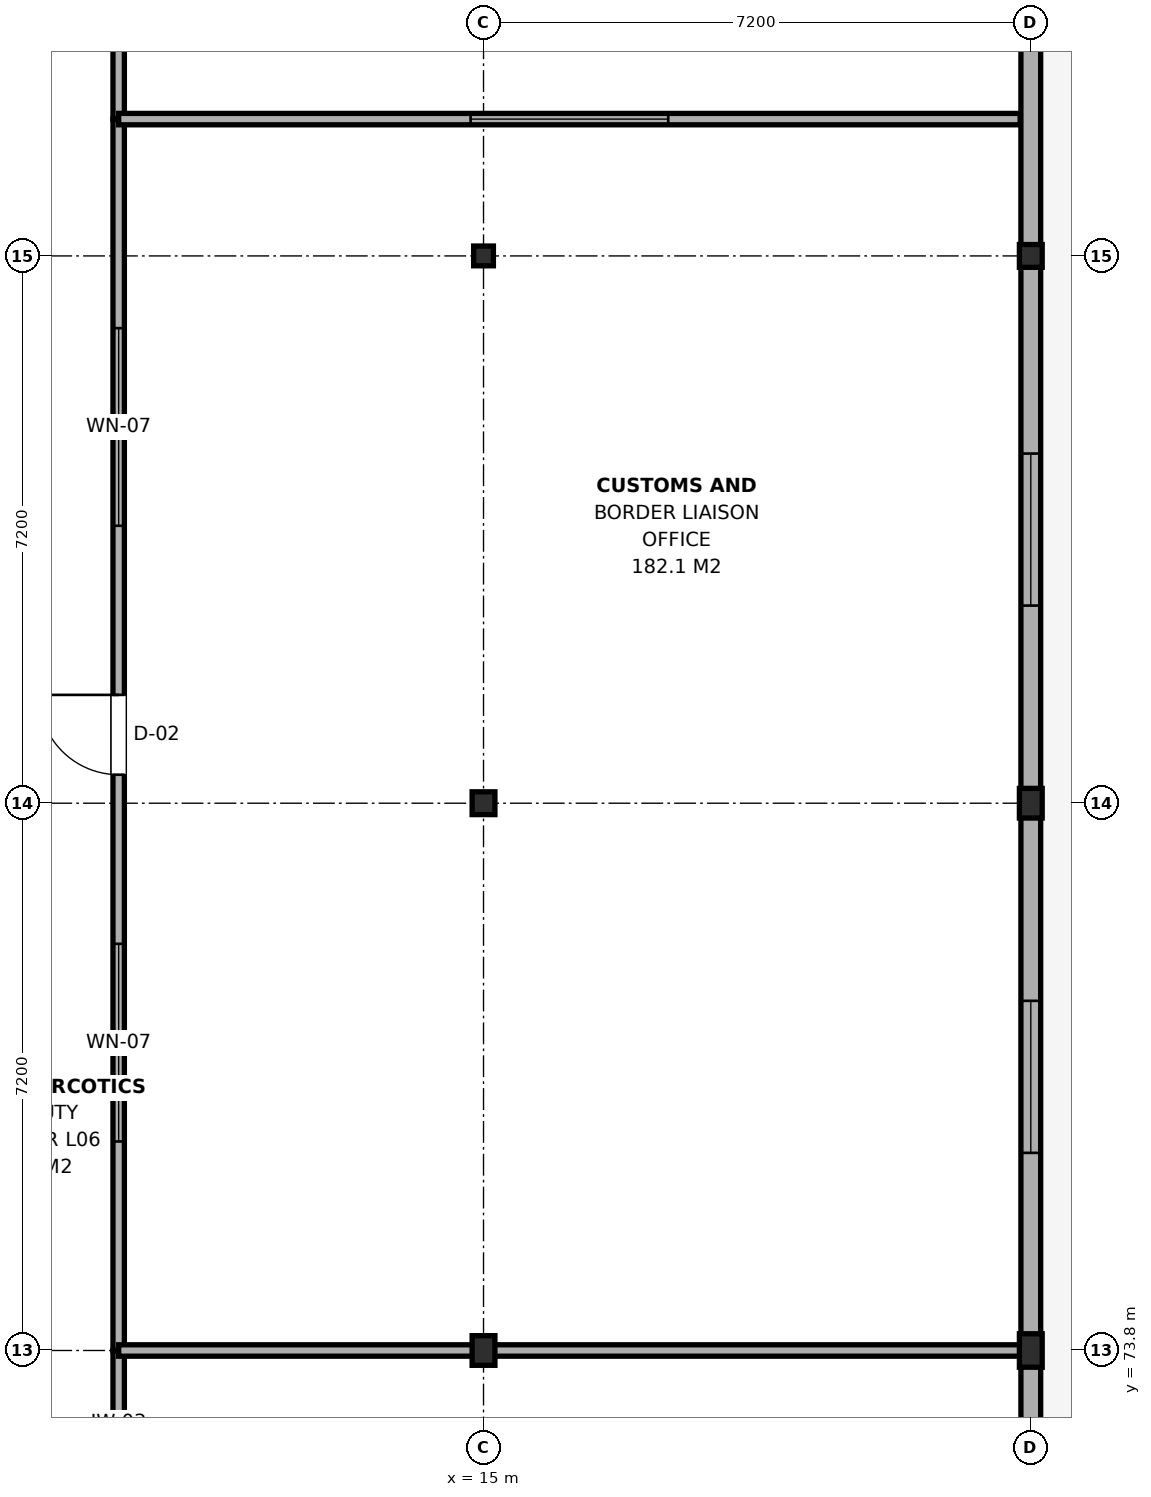
"""IFC4 building model, lengths in metres.
Left out: names, types, materials, properties, quantities, classifications, styles, units other than length and angle.
Written with IfcOpenShell. Run it as: python <this file> out.ifc"""

import sys

from ifc_helpers import new_model, si_unit, direction, frame, frame_2d, origin, origin_2d, place, context, subcontext, project, spatial, rectangle, i_section, extrude, element, fill, save


model = new_model("IFC4")
c1 = context("Model", 3, precision=1e-05, world=origin(), true_north=direction((0.0, 1.0)))
c2 = subcontext(c1, "Body", "Model", "MODEL_VIEW")
j1 = project(units=[si_unit("LENGTHUNIT", "METRE"), si_unit("PLANEANGLEUNIT", "RADIAN")], contexts=[c1])
p1 = place(None, origin())
s1 = spatial("IfcSite", under=j1, at=p1, CompositionType="ELEMENT")
p2 = place(p1, origin())
s2 = spatial("IfcBuilding", under=s1, at=p2, CompositionType="ELEMENT")
p3 = place(p2, frame((0.0, 0.0, 24.9)))
s3 = spatial("IfcBuildingStorey", under=s2, at=p3, CompositionType="ELEMENT", Elevation=24.9)
p4 = place(p3, frame((15.0, 73.8, 0.0), z_axis=(0.0, 0.0, 1.0), x_axis=(1.0, 0.0, 0.0)))
e1 = element("IfcColumn", 1, at=p4, inside=s3, PredefinedType="COLUMN", context=c2, shape_type="SweptSolid", body=[
    extrude(i_section(OverallWidth=0.3, OverallDepth=0.39, WebThickness=0.011, FlangeThickness=0.019, FilletRadius=0.027, at=origin_2d()), origin(), (0.0, 0.0, 1.0), 3.9),
])
p5 = place(p3, frame((15.0, 81.0, 0.0), z_axis=(0.0, 0.0, 1.0), x_axis=(1.0, 0.0, 0.0)))
e2 = element("IfcColumn", 2, at=p5, inside=s3, PredefinedType="COLUMN", context=c2, shape_type="SweptSolid", body=[
    extrude(i_section(OverallWidth=0.3, OverallDepth=0.3, WebThickness=0.011, FlangeThickness=0.019, FilletRadius=0.027, at=origin_2d()), origin(), (0.0, 0.0, 1.0), 3.9),
])
p6 = place(p3, frame((15.0, 88.2, 0.0), z_axis=(0.0, 0.0, 1.0), x_axis=(1.0, 0.0, 0.0)))
e3 = element("IfcColumn", 3, at=p6, inside=s3, PredefinedType="COLUMN", context=c2, shape_type="SweptSolid", body=[
    extrude(i_section(OverallWidth=0.26, OverallDepth=0.26, WebThickness=0.01, FlangeThickness=0.018, FilletRadius=0.024, at=origin_2d()), origin(), (0.0, 0.0, 1.0), 3.9),
])
p7 = place(p3, frame((22.2, 73.8, 0.0), z_axis=(0.0, 0.0, 1.0), x_axis=(1.0, 0.0, 0.0)))
e4 = element("IfcColumn", 4, at=p7, inside=s3, PredefinedType="COLUMN", context=c2, shape_type="SweptSolid", body=[
    extrude(i_section(OverallWidth=0.3, OverallDepth=0.44, WebThickness=0.011, FlangeThickness=0.021, FilletRadius=0.027, at=origin_2d()), origin(), (0.0, 0.0, 1.0), 3.9),
])
p8 = place(p3, frame((22.2, 81.0, 0.0), z_axis=(0.0, 0.0, 1.0), x_axis=(1.0, 0.0, 0.0)))
e5 = element("IfcColumn", 5, at=p8, inside=s3, PredefinedType="COLUMN", context=c2, shape_type="SweptSolid", body=[
    extrude(i_section(OverallWidth=0.3, OverallDepth=0.39, WebThickness=0.011, FlangeThickness=0.019, FilletRadius=0.027, at=origin_2d()), origin(), (0.0, 0.0, 1.0), 3.9),
])
p9 = place(p3, frame((22.2, 88.2, 0.0), z_axis=(0.0, 0.0, 1.0), x_axis=(1.0, 0.0, 0.0)))
e6 = element("IfcColumn", 6, at=p9, inside=s3, PredefinedType="COLUMN", context=c2, shape_type="SweptSolid", body=[
    extrude(i_section(OverallWidth=0.3, OverallDepth=0.3, WebThickness=0.011, FlangeThickness=0.019, FilletRadius=0.027, at=origin_2d()), origin(), (0.0, 0.0, 1.0), 3.9),
])
p10 = place(p3, frame((22.2, 66.6, 0.0), z_axis=(0.0, 0.0, 1.0), x_axis=(0.0, 1.0, 0.0)))
e7 = element("IfcWall", 7, at=p10, inside=s3, PredefinedType="SOLIDWALL", context=c2, shape_type="SweptSolid", body=[
    extrude(rectangle(XDim=7.2, YDim=0.26, at=frame_2d((3.6, 0.0))), origin(), (0.0, 0.0, 1.0), 3.115),
])
p11 = place(p10, frame((2.6, 0.0, 0.9)))
e8 = element("IfcOpeningElement", 8, at=p11, cuts=e7, PredefinedType="OPENING", context=c2, shape_type="SweptSolid", body=[
    extrude(rectangle(XDim=2.0, YDim=1.8, at=frame_2d((1.0, 0.9))), frame((0.0, 0.145, 0.0), z_axis=(0.0, -1.0, 0.0), x_axis=(1.0, 0.0, 0.0)), (0.0, 0.0, 1.0), 0.29),
])
p12 = place(p3, frame((22.2, 73.8, 0.0), z_axis=(0.0, 0.0, 1.0), x_axis=(0.0, 1.0, 0.0)))
e9 = element("IfcWall", 9, at=p12, inside=s3, PredefinedType="SOLIDWALL", context=c2, shape_type="SweptSolid", body=[
    extrude(rectangle(XDim=7.2, YDim=0.26, at=frame_2d((3.6, 0.0))), origin(), (0.0, 0.0, 1.0), 3.115),
])
p13 = place(p12, frame((2.6, 0.0, 0.9)))
e10 = element("IfcOpeningElement", 10, at=p13, cuts=e9, PredefinedType="OPENING", context=c2, shape_type="SweptSolid", body=[
    extrude(rectangle(XDim=2.0, YDim=1.8, at=frame_2d((1.0, 0.9))), frame((0.0, 0.145, 0.0), z_axis=(0.0, -1.0, 0.0), x_axis=(1.0, 0.0, 0.0)), (0.0, 0.0, 1.0), 0.29),
])
p14 = place(p3, frame((22.2, 81.0, 0.0), z_axis=(0.0, 0.0, 1.0), x_axis=(0.0, 1.0, 0.0)))
e11 = element("IfcWall", 11, at=p14, inside=s3, PredefinedType="SOLIDWALL", context=c2, shape_type="SweptSolid", body=[
    extrude(rectangle(XDim=7.2, YDim=0.26, at=frame_2d((3.6, 0.0))), origin(), (0.0, 0.0, 1.0), 3.115),
])
p15 = place(p14, frame((2.6, 0.0, 0.9)))
e12 = element("IfcOpeningElement", 12, at=p15, cuts=e11, PredefinedType="OPENING", context=c2, shape_type="SweptSolid", body=[
    extrude(rectangle(XDim=2.0, YDim=1.8, at=frame_2d((1.0, 0.9))), frame((0.0, 0.145, 0.0), z_axis=(0.0, -1.0, 0.0), x_axis=(1.0, 0.0, 0.0)), (0.0, 0.0, 1.0), 0.29),
])
p16 = place(p3, frame((22.2, 88.2, 0.0), z_axis=(0.0, 0.0, 1.0), x_axis=(0.0, 1.0, 0.0)))
e13 = element("IfcWall", 13, at=p16, inside=s3, PredefinedType="SOLIDWALL", context=c2, shape_type="SweptSolid", body=[
    extrude(rectangle(XDim=7.8, YDim=0.26, at=frame_2d((3.9, 0.0))), origin(), (0.0, 0.0, 1.0), 3.165),
])
p17 = place(p16, frame((2.9, 0.0, 0.9)))
e14 = element("IfcOpeningElement", 14, at=p17, cuts=e13, PredefinedType="OPENING", context=c2, shape_type="SweptSolid", body=[
    extrude(rectangle(XDim=2.0, YDim=1.8, at=frame_2d((1.0, 0.9))), frame((0.0, 0.145, 0.0), z_axis=(0.0, -1.0, 0.0), x_axis=(1.0, 0.0, 0.0)), (0.0, 0.0, 1.0), 0.29),
])
p18 = place(p3, frame((10.2, 53.2, 0.0), z_axis=(0.0, 0.0, 1.0), x_axis=(0.0, 1.0, 0.0)))
e15 = element("IfcWall", 15, at=p18, inside=s3, PredefinedType="PARTITIONING", context=c2, shape_type="SweptSolid", body=[
    extrude(rectangle(XDim=20.6, YDim=0.15, at=frame_2d((10.3, 0.0))), origin(), (0.0, 0.0, 1.0), 3.165),
])
p19 = place(p18, frame((9.5, 0.0, 0.0)))
e16 = element("IfcOpeningElement", 16, at=p19, cuts=e15, PredefinedType="OPENING", context=c2, shape_type="SweptSolid", body=[
    extrude(rectangle(XDim=1.6, YDim=2.15, at=frame_2d((0.8, 1.075))), frame((0.0, 0.09, 0.0), z_axis=(0.0, -1.0, 0.0), x_axis=(1.0, 0.0, 0.0)), (0.0, 0.0, 1.0), 0.18),
])
p20 = place(p18, frame((3.85, 0.0, 0.95)))
e17 = element("IfcOpeningElement", 17, at=p20, cuts=e15, PredefinedType="OPENING", context=c2, shape_type="SweptSolid", body=[
    extrude(rectangle(XDim=2.6, YDim=1.5, at=frame_2d((1.3, 0.75))), frame((0.0, 0.09, 0.0), z_axis=(0.0, -1.0, 0.0), x_axis=(1.0, 0.0, 0.0)), (0.0, 0.0, 1.0), 0.18),
])
p21 = place(p18, frame((14.15, 0.0, 0.95)))
e18 = element("IfcOpeningElement", 18, at=p21, cuts=e15, PredefinedType="OPENING", context=c2, shape_type="SweptSolid", body=[
    extrude(rectangle(XDim=2.6, YDim=1.5, at=frame_2d((1.3, 0.75))), frame((0.0, 0.09, 0.0), z_axis=(0.0, -1.0, 0.0), x_axis=(1.0, 0.0, 0.0)), (0.0, 0.0, 1.0), 0.18),
])
p22 = place(p3, frame((10.2, 73.8, 0.0), z_axis=(0.0, 0.0, 1.0), x_axis=(0.0, 1.0, 0.0)))
e19 = element("IfcWall", 19, at=p22, inside=s3, PredefinedType="PARTITIONING", context=c2, shape_type="SweptSolid", body=[
    extrude(rectangle(XDim=16.2, YDim=0.15, at=frame_2d((8.1, 0.0))), origin(), (0.0, 0.0, 1.0), 3.165),
])
p23 = place(p22, frame((7.575, 0.0, 0.0)))
e20 = element("IfcOpeningElement", 20, at=p23, cuts=e19, PredefinedType="OPENING", context=c2, shape_type="SweptSolid", body=[
    extrude(rectangle(XDim=1.05, YDim=2.15, at=frame_2d((0.525, 1.075))), frame((0.0, 0.09, 0.0), z_axis=(0.0, -1.0, 0.0), x_axis=(1.0, 0.0, 0.0)), (0.0, 0.0, 1.0), 0.18),
])
p24 = place(p22, frame((2.75, 0.0, 0.95)))
e21 = element("IfcOpeningElement", 21, at=p24, cuts=e19, PredefinedType="OPENING", context=c2, shape_type="SweptSolid", body=[
    extrude(rectangle(XDim=2.6, YDim=1.5, at=frame_2d((1.3, 0.75))), frame((0.0, 0.09, 0.0), z_axis=(0.0, -1.0, 0.0), x_axis=(1.0, 0.0, 0.0)), (0.0, 0.0, 1.0), 0.18),
])
p25 = place(p22, frame((10.85, 0.0, 0.95)))
e22 = element("IfcOpeningElement", 22, at=p25, cuts=e19, PredefinedType="OPENING", context=c2, shape_type="SweptSolid", body=[
    extrude(rectangle(XDim=2.6, YDim=1.5, at=frame_2d((1.3, 0.75))), frame((0.0, 0.09, 0.0), z_axis=(0.0, -1.0, 0.0), x_axis=(1.0, 0.0, 0.0)), (0.0, 0.0, 1.0), 0.18),
])
p26 = place(p3, frame((10.2, 73.8, 0.0), z_axis=(0.0, 0.0, 1.0), x_axis=(1.0, 0.0, 0.0)))
e23 = element("IfcWall", 23, at=p26, inside=s3, PredefinedType="PARTITIONING", context=c2, shape_type="SweptSolid", body=[
    extrude(rectangle(XDim=11.86, YDim=0.15, at=frame_2d((5.93, 0.0))), origin(), (0.0, 0.0, 1.0), 3.365),
])
p27 = place(p3, frame((10.2, 90.0, 0.0), z_axis=(0.0, 0.0, 1.0), x_axis=(0.0, 1.0, 0.0)))
e24 = element("IfcWall", 24, at=p27, inside=s3, PredefinedType="PARTITIONING", context=c2, shape_type="SweptSolid", body=[
    extrude(rectangle(XDim=14.24, YDim=0.15, at=frame_2d((7.12, 0.0))), origin(), (0.0, 0.0, 1.0), 3.165),
])
p28 = place(p27, frame((6.32, 0.0, 0.0)))
e25 = element("IfcOpeningElement", 25, at=p28, cuts=e24, PredefinedType="OPENING", context=c2, shape_type="SweptSolid", body=[
    extrude(rectangle(XDim=1.6, YDim=2.15, at=frame_2d((0.8, 1.075))), frame((0.0, 0.09, 0.0), z_axis=(0.0, -1.0, 0.0), x_axis=(1.0, 0.0, 0.0)), (0.0, 0.0, 1.0), 0.18),
])
p29 = place(p3, frame((10.2, 90.0, 0.0), z_axis=(0.0, 0.0, 1.0), x_axis=(1.0, 0.0, 0.0)))
e26 = element("IfcWall", 26, at=p29, inside=s3, PredefinedType="PARTITIONING", context=c2, shape_type="SweptSolid", body=[
    extrude(rectangle(XDim=11.86, YDim=0.15, at=frame_2d((5.93, 0.0))), origin(), (0.0, 0.0, 1.0), 3.165),
])
p30 = place(p29, frame((4.63, 0.0, 0.95)))
e27 = element("IfcOpeningElement", 27, at=p30, cuts=e26, PredefinedType="OPENING", context=c2, shape_type="SweptSolid", body=[
    extrude(rectangle(XDim=2.6, YDim=1.5, at=frame_2d((1.3, 0.75))), frame((0.0, 0.09, 0.0), z_axis=(0.0, -1.0, 0.0), x_axis=(1.0, 0.0, 0.0)), (0.0, 0.0, 1.0), 0.18),
])
p31 = place(p13, origin())
e28 = element("IfcWindow", 28, at=p31, inside=s3, PartitioningType="SINGLE_PANEL", PredefinedType="WINDOW", context=c2, shape_type="SweptSolid", body=[
    extrude(rectangle(XDim=2.0, YDim=1.8, at=frame_2d((1.0, 0.9))), frame((0.0, 0.03, 0.0), z_axis=(0.0, -1.0, 0.0), x_axis=(1.0, 0.0, 0.0)), (0.0, 0.0, 1.0), 0.06),
])
fill(e10, e28)
p32 = place(p15, origin())
e29 = element("IfcWindow", 29, at=p32, inside=s3, PartitioningType="SINGLE_PANEL", PredefinedType="WINDOW", context=c2, shape_type="SweptSolid", body=[
    extrude(rectangle(XDim=2.0, YDim=1.8, at=frame_2d((1.0, 0.9))), frame((0.0, 0.03, 0.0), z_axis=(0.0, -1.0, 0.0), x_axis=(1.0, 0.0, 0.0)), (0.0, 0.0, 1.0), 0.06),
])
fill(e12, e29)
p33 = place(p23, origin())
e30 = element("IfcDoor", 30, at=p33, inside=s3, OperationType="SINGLE_SWING_RIGHT", PredefinedType="DOOR", context=c2, shape_type="SweptSolid", body=[
    extrude(rectangle(XDim=1.05, YDim=2.15, at=frame_2d((0.525, 1.075))), frame((0.0, 0.025, 0.0), z_axis=(0.0, -1.0, 0.0), x_axis=(1.0, 0.0, 0.0)), (0.0, 0.0, 1.0), 0.05),
])
fill(e20, e30)
p34 = place(p24, origin())
e31 = element("IfcWindow", 31, at=p34, inside=s3, PartitioningType="SINGLE_PANEL", PredefinedType="WINDOW", context=c2, shape_type="SweptSolid", body=[
    extrude(rectangle(XDim=2.6, YDim=1.5, at=frame_2d((1.3, 0.75))), frame((0.0, 0.03, 0.0), z_axis=(0.0, -1.0, 0.0), x_axis=(1.0, 0.0, 0.0)), (0.0, 0.0, 1.0), 0.06),
])
fill(e21, e31)
p35 = place(p25, origin())
e32 = element("IfcWindow", 32, at=p35, inside=s3, PartitioningType="SINGLE_PANEL", PredefinedType="WINDOW", context=c2, shape_type="SweptSolid", body=[
    extrude(rectangle(XDim=2.6, YDim=1.5, at=frame_2d((1.3, 0.75))), frame((0.0, 0.03, 0.0), z_axis=(0.0, -1.0, 0.0), x_axis=(1.0, 0.0, 0.0)), (0.0, 0.0, 1.0), 0.06),
])
fill(e22, e32)
p36 = place(p30, origin())
e33 = element("IfcWindow", 33, at=p36, inside=s3, PartitioningType="SINGLE_PANEL", PredefinedType="WINDOW", context=c2, shape_type="SweptSolid", body=[
    extrude(rectangle(XDim=2.6, YDim=1.5, at=frame_2d((1.3, 0.75))), frame((0.0, 0.03, 0.0), z_axis=(0.0, -1.0, 0.0), x_axis=(1.0, 0.0, 0.0)), (0.0, 0.0, 1.0), 0.06),
])
fill(e27, e33)
save(model, sys.argv[1])
